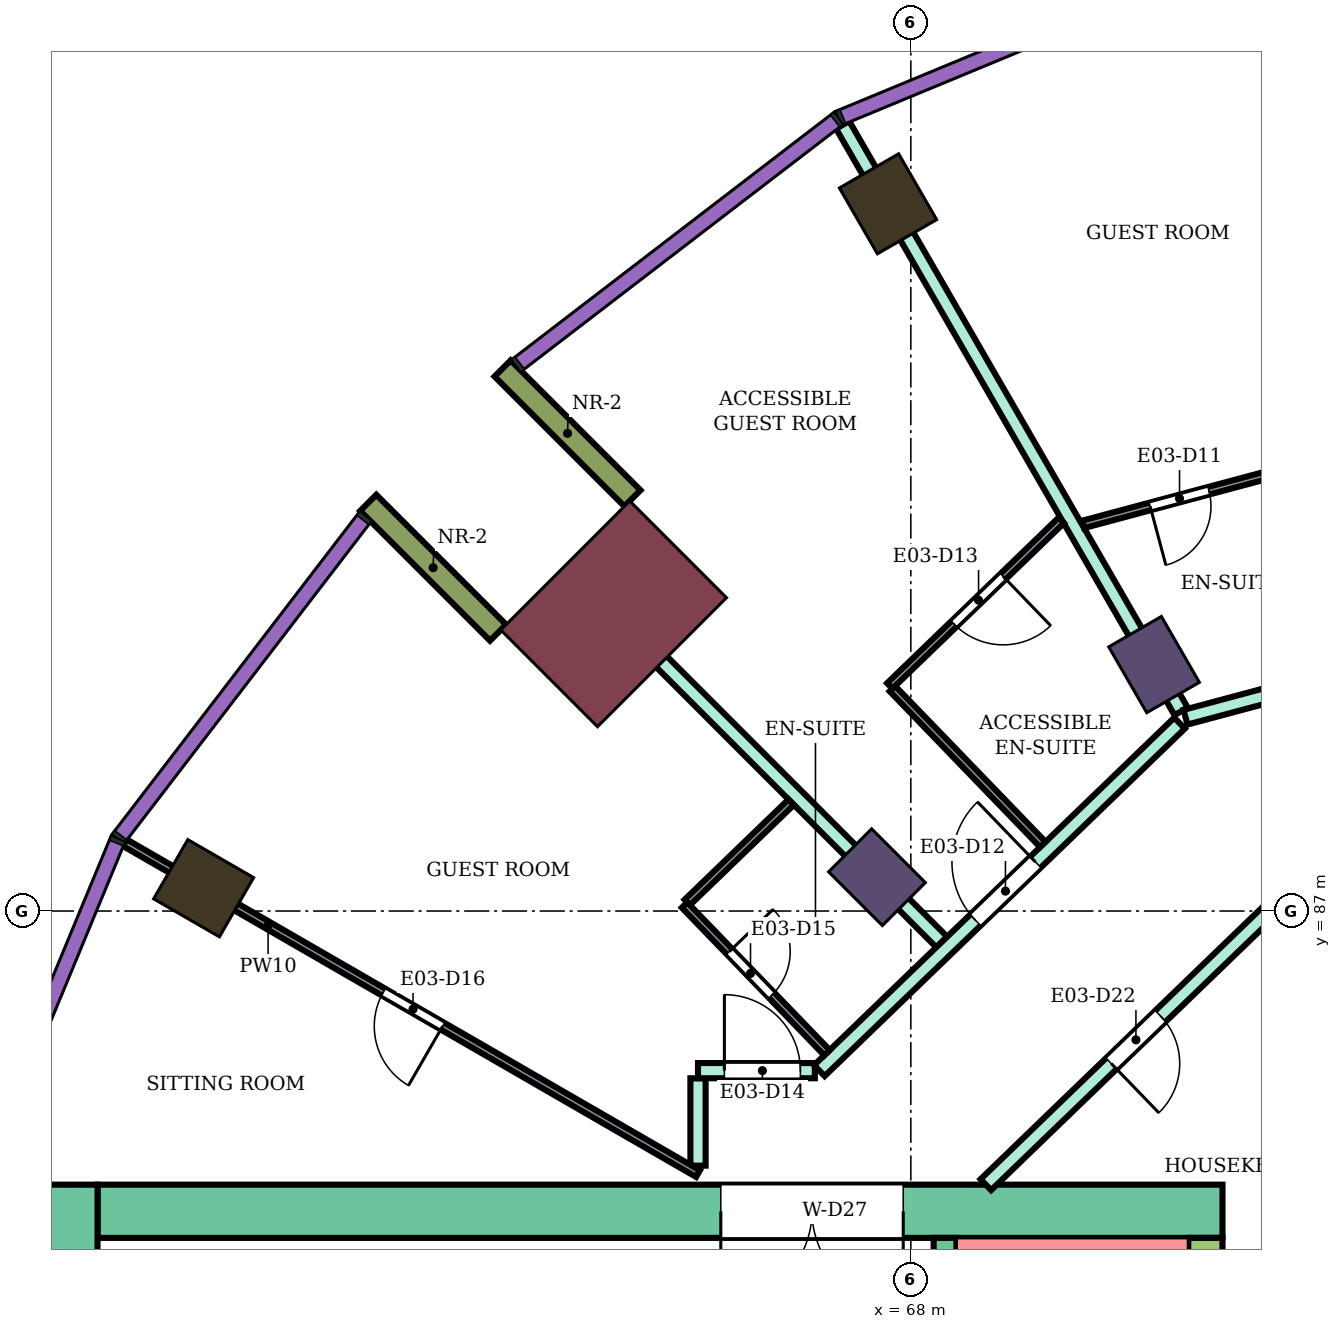
"""IFC4 building model, lengths in metres.
Left out: names, types, materials, properties, quantities, classifications, styles, units other than length and angle.
Written with IfcOpenShell. Run it as: python <this file> out.ifc"""

import sys

from ifc_helpers import new_model, si_unit, direction, frame, frame_2d, origin, origin_2d, place, context, subcontext, project, spatial, rectangle, extrude, element, fill, save


model = new_model("IFC4")
c1 = context("Model", 3, precision=1e-05, world=origin(), true_north=direction((0.0, 1.0)))
c2 = subcontext(c1, "Body", "Model", "MODEL_VIEW")
j1 = project(units=[si_unit("LENGTHUNIT", "METRE"), si_unit("PLANEANGLEUNIT", "RADIAN")], contexts=[c1])
p1 = place(None, origin())
s1 = spatial("IfcSite", under=j1, at=p1, CompositionType="ELEMENT")
p2 = place(p1, origin())
s2 = spatial("IfcBuilding", under=s1, at=p2, CompositionType="ELEMENT")
p3 = place(p2, frame((0.0, 0.0, 145.8)))
s3 = spatial("IfcBuildingStorey", under=s2, at=p3, CompositionType="ELEMENT", Elevation=145.8)
for number, where, z_axis, x_axis in (
    (1, (67.7, 96.304, 0.0), (0.0, 0.0, 1.0), (-0.5, 0.866, 0.0)),
    (2, (58.696, 87.3, 0.0), (0.0, 0.0, 1.0), (-0.866, 0.5, 0.0)),
):
    element("IfcColumn", number, at=place(p3, frame(where, z_axis=z_axis, x_axis=x_axis)), inside=s3, PredefinedType="COLUMN", context=c2, shape_type="SweptSolid", body=[
        extrude(rectangle(XDim=1.0, YDim=0.9, at=origin_2d()), origin(), (0.0, 0.0, 1.0), 3.9),
    ])
for number, where, z_axis, x_axis in (
    (3, (71.2, 90.242, 0.0), (0.0, 0.0, 1.0), (-0.5, 0.866, 0.0)),
    (4, (67.555, 87.445, 0.0), (0.0, 0.0, 1.0), (-0.707, 0.707, 0.0)),
):
    element("IfcColumn", number, at=place(p3, frame(where, z_axis=z_axis, x_axis=x_axis)), inside=s3, PredefinedType="COLUMN", context=c2, shape_type="SweptSolid", body=[
        extrude(rectangle(XDim=1.0, YDim=0.8, at=origin_2d()), origin(), (0.0, 0.0, 1.0), 3.9),
    ])
p4 = place(p3, frame((64.09, 90.91, 0.0), z_axis=(0.0, 0.0, 1.0), x_axis=(-0.707106781187, 0.707106781187, 0.0)))
e5 = element("IfcColumn", 5, at=p4, inside=s3, PredefinedType="COLUMN", context=c2, shape_type="SweptSolid", body=[
    extrude(rectangle(XDim=1.8, YDim=2.4, at=origin_2d()), origin(), (0.0, 0.0, 1.0), 3.9),
])
p5 = place(p3, frame((72.1, 83.05, 0.0), z_axis=(0.0, 0.0, 1.0), x_axis=(-1.0, 0.0, 0.0)))
e6 = element("IfcWall", 6, at=p5, inside=s3, PredefinedType="SHEAR", context=c2, shape_type="SweptSolid", body=[
    extrude(rectangle(XDim=14.8, YDim=0.7, at=frame_2d((7.4, 0.0))), origin(), (0.0, 0.0, 1.0), 3.5),
])
p6 = place(p5, frame((4.2, 0.0, 0.0)))
e7 = element("IfcOpeningElement", 7, at=p6, cuts=e6, PredefinedType="OPENING", context=c2, shape_type="SweptSolid", body=[
    extrude(rectangle(XDim=2.4, YDim=2.4, at=frame_2d((1.2, 1.2))), frame((0.0, 0.36, 0.0), z_axis=(0.0, -1.0, 0.0), x_axis=(1.0, 0.0, 0.0)), (0.0, 0.0, 1.0), 0.72),
])
p7 = place(p3, frame((71.875, 82.7, 0.0), z_axis=(0.0, 0.0, 1.0), x_axis=(0.0, -1.0, 0.0)))
e8 = element("IfcWall", 8, at=p7, inside=s3, PredefinedType="SHEAR", context=c2, shape_type="SweptSolid", body=[
    extrude(rectangle(XDim=7.7, YDim=0.45, at=frame_2d((3.85, 0.0))), origin(), (0.0, 0.0, 1.0), 3.5),
])
p8 = place(p3, frame((56.95, 83.4, 0.0), z_axis=(0.0, 0.0, 1.0), x_axis=(0.0, -1.0, 0.0)))
e9 = element("IfcWall", 9, at=p8, inside=s3, PredefinedType="SHEAR", context=c2, shape_type="SweptSolid", body=[
    extrude(rectangle(XDim=16.8, YDim=0.7, at=frame_2d((8.4, 0.0))), origin(), (0.0, 0.0, 1.0), 3.5),
])
p9 = place(p3, frame((68.45, 82.7, 0.0), z_axis=(0.0, 0.0, 1.0), x_axis=(0.0, -1.0, 0.0)))
e10 = element("IfcWall", 10, at=p9, inside=s3, PredefinedType="SHEAR", context=c2, shape_type="SweptSolid", body=[
    extrude(rectangle(XDim=7.7, YDim=0.3, at=frame_2d((3.85, 0.0))), origin(), (0.0, 0.0, 1.0), 3.5),
])
p10 = place(p9, frame((0.35, 0.0, 0.0)))
e11 = element("IfcOpeningElement", 11, at=p10, cuts=e10, PredefinedType="OPENING", context=c2, shape_type="SweptSolid", body=[
    extrude(rectangle(XDim=0.9, YDim=2.1, at=frame_2d((0.45, 1.05))), frame((0.0, 0.16, 0.0), z_axis=(0.0, -1.0, 0.0), x_axis=(1.0, 0.0, 0.0)), (0.0, 0.0, 1.0), 0.32),
])
for number, where, z_axis, x_axis in (
    (12, (64.338, 92.43, 0.0), (0.0, 0.0, 1.0), (-0.707, 0.707, 0.0)),
    (13, (62.57, 90.662, 0.0), (0.0, 0.0, 1.0), (-0.707, 0.707, 0.0)),
):
    element("IfcWall", number, at=place(p3, frame(where, z_axis=z_axis, x_axis=x_axis)), inside=s3, PredefinedType="NOTDEFINED", context=c2, shape_type="SweptSolid", body=[
        extrude(rectangle(XDim=2.416, YDim=0.3, at=frame_2d((1.208, 0.0))), origin(), (0.0, 0.0, 1.0), 3.9),
    ])
p11 = place(p3, frame((63.596, 91.406, 0.0), z_axis=(0.0, 0.0, 1.0), x_axis=(0.706963264491, -0.707250268759, 0.0)))
e14 = element("IfcWall", 14, at=p11, inside=s3, PredefinedType="PARTITIONING", context=c2, shape_type="SweptSolid", body=[
    extrude(rectangle(XDim=6.805, YDim=0.2, at=frame_2d((3.403, 0.0))), origin(), (0.0, 0.0, 1.0), 3.45),
])
p12 = place(p3, frame((65.2, 83.65, 0.0), z_axis=(0.0, 0.0, 1.0), x_axis=(0.0, 1.0, 0.0)))
e15 = element("IfcWall", 15, at=p12, inside=s3, PredefinedType="PARTITIONING", context=c2, shape_type="SweptSolid", body=[
    extrude(rectangle(XDim=1.15, YDim=0.2, at=frame_2d((0.575, 0.0))), origin(), (0.0, 0.0, 1.0), 3.45),
])
p13 = place(p3, frame((65.2, 84.9, 0.0), z_axis=(0.0, 0.0, 1.0), x_axis=(1.0, 0.0, 0.0)))
e16 = element("IfcWall", 16, at=p13, inside=s3, PredefinedType="PARTITIONING", context=c2, shape_type="SweptSolid", body=[
    extrude(rectangle(XDim=1.537, YDim=0.2, at=frame_2d((0.769, 0.0))), origin(), (0.0, 0.0, 1.0), 3.45),
])
p14 = place(p13, frame((0.347, 0.0, 0.0)))
e17 = element("IfcOpeningElement", 17, at=p14, cuts=e16, PredefinedType="OPENING", context=c2, shape_type="SweptSolid", body=[
    extrude(rectangle(XDim=1.0, YDim=2.1, at=frame_2d((0.5, 1.05))), frame((0.0, 0.11, 0.0), z_axis=(0.0, -1.0, 0.0), x_axis=(1.0, 0.0, 0.0)), (0.0, 0.0, 1.0), 0.22),
])
p15 = place(p3, frame((66.797, 84.9, 0.0), z_axis=(0.0, 0.0, 1.0), x_axis=(0.719692092412, 0.694293376116, 0.0)))
e18 = element("IfcWall", 18, at=p15, inside=s3, PredefinedType="PARTITIONING", context=c2, shape_type="SweptSolid", body=[
    extrude(rectangle(XDim=6.584, YDim=0.2, at=frame_2d((3.292, 0.0))), origin(), (0.0, 0.0, 1.0), 3.45),
])
p16 = place(p15, frame((2.852, 0.0, 0.0)))
e19 = element("IfcOpeningElement", 19, at=p16, cuts=e18, PredefinedType="OPENING", context=c2, shape_type="SweptSolid", body=[
    extrude(rectangle(XDim=1.1, YDim=2.1, at=frame_2d((0.55, 1.05))), frame((0.0, 0.11, 0.0), z_axis=(0.0, -1.0, 0.0), x_axis=(1.0, 0.0, 0.0)), (0.0, 0.0, 1.0), 0.22),
])
p17 = place(p3, frame((67.103, 97.342, 0.0), z_axis=(0.0, 0.0, 1.0), x_axis=(0.499900389553, -0.866082906265, 0.0)))
e20 = element("IfcWall", 20, at=p17, inside=s3, PredefinedType="PARTITIONING", context=c2, shape_type="SweptSolid", body=[
    extrude(rectangle(XDim=8.908, YDim=0.2, at=frame_2d((4.454, 0.0))), origin(), (0.0, 0.0, 1.0), 3.45),
])
p18 = place(p3, frame((68.987, 83.4, 0.0), z_axis=(0.0, 0.0, 1.0), x_axis=(0.719547721855, 0.694442996922, 0.0)))
e21 = element("IfcWall", 21, at=p18, inside=s3, PredefinedType="PARTITIONING", context=c2, shape_type="SweptSolid", body=[
    extrude(rectangle(XDim=5.378, YDim=0.2, at=frame_2d((2.689, 0.0))), origin(), (0.0, 0.0, 1.0), 3.45),
])
p19 = place(p18, frame((2.294, 0.0, 0.0)))
e22 = element("IfcOpeningElement", 22, at=p19, cuts=e21, PredefinedType="OPENING", context=c2, shape_type="SweptSolid", body=[
    extrude(rectangle(XDim=0.9, YDim=2.1, at=frame_2d((0.45, 1.05))), frame((0.0, 0.11, 0.0), z_axis=(0.0, -1.0, 0.0), x_axis=(1.0, 0.0, 0.0)), (0.0, 0.0, 1.0), 0.22),
])
p20 = place(p3, frame((71.614, 89.55, 0.0), z_axis=(0.0, 0.0, 1.0), x_axis=(0.965982156828, 0.258608725086, 0.0)))
e23 = element("IfcWall", 23, at=p20, inside=s3, PredefinedType="PARTITIONING", context=c2, shape_type="SweptSolid", body=[
    extrude(rectangle(XDim=8.592, YDim=0.2, at=frame_2d((4.296, 0.0))), origin(), (0.0, 0.0, 1.0), 3.45),
])
p21 = place(p20, frame((4.865, 0.0, 0.0)))
e24 = element("IfcOpeningElement", 24, at=p21, cuts=e23, PredefinedType="OPENING", context=c2, shape_type="SweptSolid", body=[
    extrude(rectangle(XDim=1.0, YDim=2.1, at=frame_2d((0.5, 1.05))), frame((0.0, 0.11, 0.0), z_axis=(0.0, -1.0, 0.0), x_axis=(1.0, 0.0, 0.0)), (0.0, 0.0, 1.0), 0.22),
])
p22 = place(p20, frame((2.804, 0.0, 0.0)))
e25 = element("IfcOpeningElement", 25, at=p22, cuts=e23, PredefinedType="OPENING", context=c2, shape_type="SweptSolid", body=[
    extrude(rectangle(XDim=1.0, YDim=2.1, at=frame_2d((0.5, 1.05))), frame((0.0, 0.11, 0.0), z_axis=(0.0, -1.0, 0.0), x_axis=(1.0, 0.0, 0.0)), (0.0, 0.0, 1.0), 0.22),
])
p23 = place(p3, frame((57.659, 87.899, 0.0), z_axis=(0.0, 0.0, 1.0), x_axis=(0.86602264145, -0.500004784474, 0.0)))
e26 = element("IfcWall", 26, at=p23, inside=s3, PredefinedType="PARTITIONING", context=c2, shape_type="SweptSolid", body=[
    extrude(rectangle(XDim=8.708, YDim=0.1, at=frame_2d((4.354, 0.0))), origin(), (0.0, 0.0, 1.0), 3.45),
])
p24 = place(p23, frame((3.929, 0.0, 0.0)))
e27 = element("IfcOpeningElement", 27, at=p24, cuts=e26, PredefinedType="OPENING", context=c2, shape_type="SweptSolid", body=[
    extrude(rectangle(XDim=0.9, YDim=2.1, at=frame_2d((0.45, 1.05))), frame((0.0, 0.06, 0.0), z_axis=(0.0, -1.0, 0.0), x_axis=(1.0, 0.0, 0.0)), (0.0, 0.0, 1.0), 0.12),
])
p25 = place(p3, frame((65.059, 87.114, 0.0), z_axis=(0.0, 0.0, 1.0), x_axis=(0.719653890619, 0.694332973232, 0.0)))
e28 = element("IfcWall", 28, at=p25, inside=s3, PredefinedType="PARTITIONING", context=c2, shape_type="SweptSolid", body=[
    extrude(rectangle(XDim=1.899, YDim=0.1, at=frame_2d((0.95, 0.0))), origin(), (0.0, 0.0, 1.0), 3.45),
])
p26 = place(p3, frame((65.023, 87.079, 0.0), z_axis=(0.0, 0.0, 1.0), x_axis=(0.694287838235, -0.719697434815, 0.0)))
e29 = element("IfcWall", 29, at=p26, inside=s3, PredefinedType="PARTITIONING", context=c2, shape_type="SweptSolid", body=[
    extrude(rectangle(XDim=2.7, YDim=0.1, at=frame_2d((1.35, 0.0))), origin(), (0.0, 0.0, 1.0), 3.45),
])
p27 = place(p26, frame((0.85, 0.0, 0.0)))
e30 = element("IfcOpeningElement", 30, at=p27, cuts=e29, PredefinedType="OPENING", context=c2, shape_type="SweptSolid", body=[
    extrude(rectangle(XDim=0.8, YDim=2.1, at=frame_2d((0.4, 1.05))), frame((0.0, 0.06, 0.0), z_axis=(0.0, -1.0, 0.0), x_axis=(1.0, 0.0, 0.0)), (0.0, 0.0, 1.0), 0.12),
])
p28 = place(p3, frame((67.758, 89.926, 0.0), z_axis=(0.0, 0.0, 1.0), x_axis=(0.694485934895, -0.719506279495, 0.0)))
e31 = element("IfcWall", 31, at=p28, inside=s3, PredefinedType="PARTITIONING", context=c2, shape_type="SweptSolid", body=[
    extrude(rectangle(XDim=2.849, YDim=0.1, at=frame_2d((1.425, 0.0))), origin(), (0.0, 0.0, 1.0), 3.45),
])
p29 = place(p3, frame((67.723, 89.962, 0.0), z_axis=(0.0, 0.0, 1.0), x_axis=(0.719487277563, 0.694505620873, 0.0)))
e32 = element("IfcWall", 32, at=p29, inside=s3, PredefinedType="PARTITIONING", context=c2, shape_type="SweptSolid", body=[
    extrude(rectangle(XDim=3.137, YDim=0.1, at=frame_2d((1.568, 0.0))), origin(), (0.0, 0.0, 1.0), 3.45),
])
p30 = place(p29, frame((1.173, 0.0, 0.0)))
e33 = element("IfcOpeningElement", 33, at=p30, cuts=e32, PredefinedType="OPENING", context=c2, shape_type="SweptSolid", body=[
    extrude(rectangle(XDim=0.9, YDim=2.1, at=frame_2d((0.45, 1.05))), frame((0.0, 0.06, 0.0), z_axis=(0.0, -1.0, 0.0), x_axis=(1.0, 0.0, 0.0)), (0.0, 0.0, 1.0), 0.12),
])
p31 = place(p3, frame((70.268, 92.087, 0.0), z_axis=(0.0, 0.0, 1.0), x_axis=(0.965937937835, 0.258773839966, 0.0)))
e34 = element("IfcWall", 34, at=p31, inside=s3, PredefinedType="PARTITIONING", context=c2, shape_type="SweptSolid", body=[
    extrude(rectangle(XDim=2.694, YDim=0.1, at=frame_2d((1.347, 0.0))), origin(), (0.0, 0.0, 1.0), 3.45),
])
p32 = place(p31, frame((0.912, 0.0, 0.0)))
e35 = element("IfcOpeningElement", 35, at=p32, cuts=e34, PredefinedType="OPENING", context=c2, shape_type="SweptSolid", body=[
    extrude(rectangle(XDim=0.8, YDim=2.1, at=frame_2d((0.4, 1.05))), frame((0.0, 0.06, 0.0), z_axis=(0.0, -1.0, 0.0), x_axis=(1.0, 0.0, 0.0)), (0.0, 0.0, 1.0), 0.12),
])
p33 = place(p32, frame((0.8, 0.0, 0.0), z_axis=(0.0, 0.0, 1.0), x_axis=(-1.0, 0.0, 0.0)))
e36 = element("IfcDoor", 36, at=p33, inside=s3, OperationType="SINGLE_SWING_RIGHT", PredefinedType="DOOR", context=c2, shape_type="SweptSolid", body=[
    extrude(rectangle(XDim=0.8, YDim=2.1, at=frame_2d((0.4, 1.05))), frame((0.0, 0.025, 0.0), z_axis=(0.0, -1.0, 0.0), x_axis=(1.0, 0.0, 0.0)), (0.0, 0.0, 1.0), 0.05),
])
fill(e35, e36)
p34 = place(p16, origin())
e37 = element("IfcDoor", 37, at=p34, inside=s3, OperationType="SINGLE_SWING_RIGHT", PredefinedType="DOOR", context=c2, shape_type="SweptSolid", body=[
    extrude(rectangle(XDim=1.1, YDim=2.1, at=frame_2d((0.55, 1.05))), frame((0.0, 0.025, 0.0), z_axis=(0.0, -1.0, 0.0), x_axis=(1.0, 0.0, 0.0)), (0.0, 0.0, 1.0), 0.05),
])
fill(e19, e37)
p35 = place(p30, frame((0.9, 0.0, 0.0), z_axis=(0.0, 0.0, 1.0), x_axis=(-1.0, 0.0, 0.0)))
e38 = element("IfcDoor", 38, at=p35, inside=s3, OperationType="SINGLE_SWING_LEFT", PredefinedType="DOOR", context=c2, shape_type="SweptSolid", body=[
    extrude(rectangle(XDim=0.9, YDim=2.1, at=frame_2d((0.45, 1.05))), frame((0.0, 0.025, 0.0), z_axis=(0.0, -1.0, 0.0), x_axis=(1.0, 0.0, 0.0)), (0.0, 0.0, 1.0), 0.05),
])
fill(e33, e38)
p36 = place(p14, origin())
e39 = element("IfcDoor", 39, at=p36, inside=s3, OperationType="SINGLE_SWING_LEFT", PredefinedType="DOOR", context=c2, shape_type="SweptSolid", body=[
    extrude(rectangle(XDim=1.0, YDim=2.1, at=frame_2d((0.5, 1.05))), frame((0.0, 0.025, 0.0), z_axis=(0.0, -1.0, 0.0), x_axis=(1.0, 0.0, 0.0)), (0.0, 0.0, 1.0), 0.05),
])
fill(e17, e39)
p37 = place(p27, origin())
e40 = element("IfcDoor", 40, at=p37, inside=s3, OperationType="SINGLE_SWING_LEFT", PredefinedType="DOOR", context=c2, shape_type="SweptSolid", body=[
    extrude(rectangle(XDim=0.8, YDim=2.1, at=frame_2d((0.4, 1.05))), frame((0.0, 0.025, 0.0), z_axis=(0.0, -1.0, 0.0), x_axis=(1.0, 0.0, 0.0)), (0.0, 0.0, 1.0), 0.05),
])
fill(e30, e40)
p38 = place(p24, frame((0.9, 0.0, 0.0), z_axis=(0.0, 0.0, 1.0), x_axis=(-1.0, 0.0, 0.0)))
e41 = element("IfcDoor", 41, at=p38, inside=s3, OperationType="SINGLE_SWING_LEFT", PredefinedType="DOOR", context=c2, shape_type="SweptSolid", body=[
    extrude(rectangle(XDim=0.9, YDim=2.1, at=frame_2d((0.45, 1.05))), frame((0.0, 0.025, 0.0), z_axis=(0.0, -1.0, 0.0), x_axis=(1.0, 0.0, 0.0)), (0.0, 0.0, 1.0), 0.05),
])
fill(e27, e41)
p39 = place(p19, frame((0.9, 0.0, 0.0), z_axis=(0.0, 0.0, 1.0), x_axis=(-1.0, 0.0, 0.0)))
e42 = element("IfcDoor", 42, at=p39, inside=s3, OperationType="SINGLE_SWING_RIGHT", PredefinedType="DOOR", context=c2, shape_type="SweptSolid", body=[
    extrude(rectangle(XDim=0.9, YDim=2.1, at=frame_2d((0.45, 1.05))), frame((0.0, 0.025, 0.0), z_axis=(0.0, -1.0, 0.0), x_axis=(1.0, 0.0, 0.0)), (0.0, 0.0, 1.0), 0.05),
])
fill(e22, e42)
p40 = place(p6, origin())
e43 = element("IfcDoor", 43, at=p40, inside=s3, OperationType="DOUBLE_DOOR_SINGLE_SWING", PredefinedType="DOOR", context=c2, shape_type="SweptSolid", body=[
    extrude(rectangle(XDim=2.4, YDim=2.4, at=frame_2d((1.2, 1.2))), frame((0.0, 0.025, 0.0), z_axis=(0.0, -1.0, 0.0), x_axis=(1.0, 0.0, 0.0)), (0.0, 0.0, 1.0), 0.05),
])
fill(e7, e43)
save(model, sys.argv[1])
